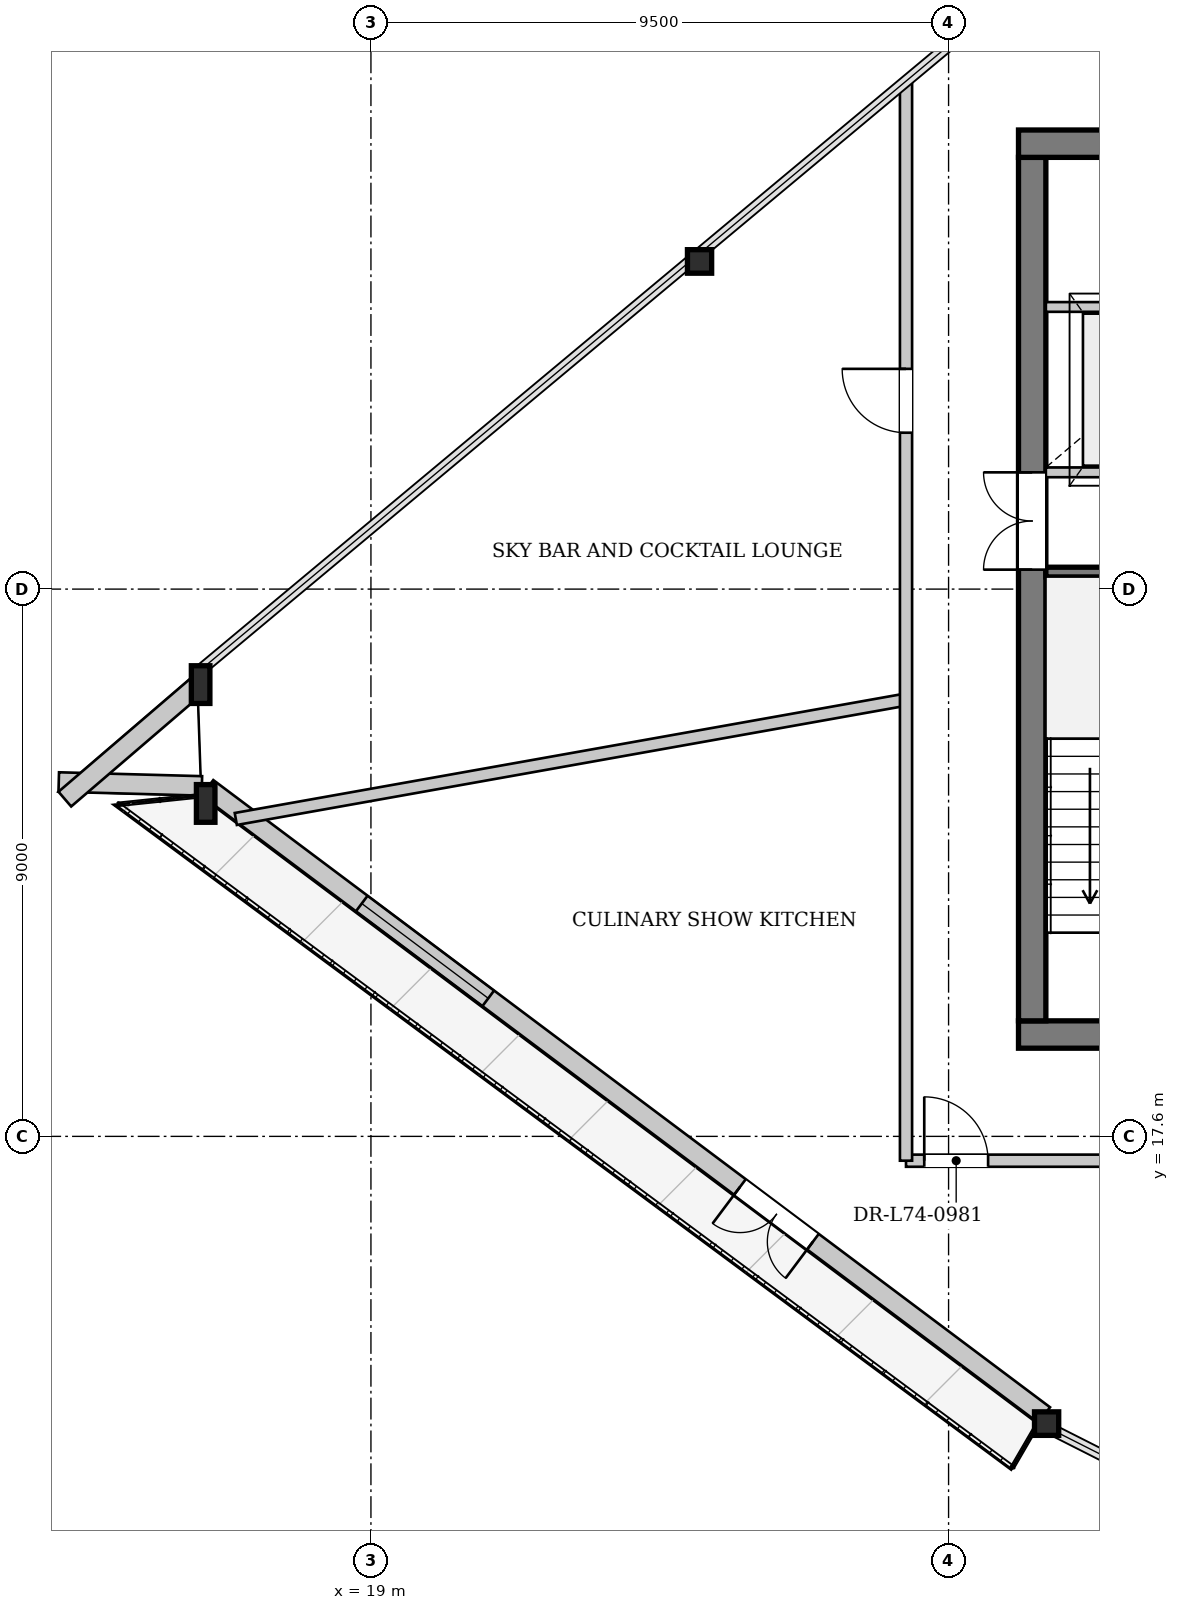
"""IFC4 building model, lengths in metres.
Left out: names, types, materials, properties, quantities, classifications, styles, units other than length and angle.
Written with IfcOpenShell. Run it as: python <this file> out.ifc"""

import sys

from ifc_helpers import new_model, si_unit, direction, frame, frame_2d, origin, origin_2d, place, context, subcontext, project, spatial, rectangle, i_section, extrude, source, transform, mapped, element, fill, save


model = new_model("IFC4")
c1 = context("Model", 3, precision=1e-05, world=origin(), true_north=direction((0.0, 1.0)))
c2 = subcontext(c1, "Body", "Model", "MODEL_VIEW")
j1 = project(units=[si_unit("LENGTHUNIT", "METRE"), si_unit("PLANEANGLEUNIT", "RADIAN")], contexts=[c1])
p1 = place(None, origin())
s1 = spatial("IfcSite", under=j1, at=p1, CompositionType="ELEMENT")
p2 = place(p1, origin())
s2 = spatial("IfcBuilding", under=s1, at=p2, CompositionType="ELEMENT")
p3 = place(p2, frame((0.0, 0.0, 277.7)))
s3 = spatial("IfcBuildingStorey", under=s2, at=p3, CompositionType="ELEMENT", Elevation=277.7)
m1 = source(origin(), c2, "Body", "SweptSolid", [
    extrude(i_section(OverallWidth=0.398, OverallDepth=0.387, WebThickness=0.019, FlangeThickness=0.029, at=origin_2d()), origin(), (0.0, 0.0, 1.0), 3.945),
])
p4 = place(p3, frame((24.417, 32.13, 0.0), z_axis=(-0.006311849175, -0.071843695024, 0.997395931436), x_axis=(0.996162921668, -0.087518189501, 0.0)))
e1 = element("IfcColumn", 1, at=p4, inside=s3, PredefinedType="COLUMN", context=c2, shape_type="MappedRepresentation", body=[
    mapped(m1, transform((0.0, 0.0, 0.0), x_axis=(1.0, 0.0, 0.0), y_axis=(0.0, 1.0, 0.0), z_axis=(0.0, 0.0, 1.0), scale=1.0)),
])
m2 = source(origin(), c2, "Body", "SweptSolid", [
    extrude(i_section(OverallWidth=0.305, OverallDepth=0.62, WebThickness=0.021, FlangeThickness=0.04, at=origin_2d()), origin(), (0.0, 0.0, 1.0), 3.956),
])
p5 = place(p3, frame((16.145, 25.227, 0.0), z_axis=(0.027522629563, -0.099661539784, 0.99464068002), x_axis=(0.963918716253, 0.266196747646, 0.0)))
e2 = element("IfcColumn", 2, at=p5, inside=s3, PredefinedType="COLUMN", context=c2, shape_type="MappedRepresentation", body=[
    mapped(m2, transform((0.0, 0.0, 0.0), x_axis=(1.0, 0.0, 0.0), y_axis=(0.0, 1.0, 0.0), z_axis=(0.0, 0.0, 1.0), scale=1.0)),
])
m3 = source(origin(), c2, "Body", "SweptSolid", [
    extrude(i_section(OverallWidth=0.305, OverallDepth=0.62, WebThickness=0.021, FlangeThickness=0.04, at=origin_2d()), origin(), (0.0, 0.0, 1.0), 3.946),
])
p6 = place(p3, frame((16.215, 23.204, 0.0), z_axis=(0.033907558739, -0.065092612761, 0.997302977647), x_axis=(0.886885299691, 0.461989680828, 0.0)))
e3 = element("IfcColumn", 3, at=p6, inside=s3, PredefinedType="COLUMN", context=c2, shape_type="MappedRepresentation", body=[
    mapped(m3, transform((0.0, 0.0, 0.0), x_axis=(1.0, 0.0, 0.0), y_axis=(0.0, 1.0, 0.0), z_axis=(0.0, 0.0, 1.0), scale=1.0)),
])
m4 = source(origin(), c2, "Body", "SweptSolid", [
    extrude(i_section(OverallWidth=0.398, OverallDepth=0.387, WebThickness=0.019, FlangeThickness=0.029, at=origin_2d()), origin(), (0.0, 0.0, 1.0), 3.945),
])
p7 = place(p3, frame((29.977, 12.889, 0.0), z_axis=(0.068826100896, -0.006560761416, 0.997607099135), x_axis=(0.094893585197, 0.995487422064, 0.0)))
e4 = element("IfcColumn", 4, at=p7, inside=s3, PredefinedType="COLUMN", context=c2, shape_type="MappedRepresentation", body=[
    mapped(m4, transform((0.0, 0.0, 0.0), x_axis=(1.0, 0.0, 0.0), y_axis=(0.0, 1.0, 0.0), z_axis=(0.0, 0.0, 1.0), scale=1.0)),
])
p8 = place(p3, frame((30.073, 13.017, 0.0), z_axis=(0.0, 0.0, 1.0), x_axis=(-0.800180538876, 0.599759206018, 0.0)))
e5 = element("IfcWall", 5, at=p8, inside=s3, PredefinedType="SOLIDWALL", context=c2, shape_type="SweptSolid", body=[
    extrude(rectangle(XDim=17.198, YDim=0.32, at=frame_2d((8.599, 0.0))), origin(), (0.0, 0.0, 1.0), 3.462),
])
p9 = place(p8, frame((4.753, 0.0, 0.0)))
e6 = element("IfcOpeningElement", 6, at=p9, cuts=e5, PredefinedType="OPENING", context=c2, shape_type="SweptSolid", body=[
    extrude(rectangle(XDim=1.5, YDim=2.3, at=frame_2d((0.75, 1.15))), frame((0.0, 0.17, 0.0), z_axis=(0.0, -1.0, 0.0), x_axis=(1.0, 0.0, 0.0)), (0.0, 0.0, 1.0), 0.34),
])
p10 = place(p8, frame((11.426, 0.0, 0.65)))
e7 = element("IfcOpeningElement", 7, at=p10, cuts=e5, PredefinedType="OPENING", context=c2, shape_type="SweptSolid", body=[
    extrude(rectangle(XDim=2.6, YDim=2.35, at=frame_2d((1.3, 1.175))), frame((0.0, 0.17, 0.0), z_axis=(0.0, -1.0, 0.0), x_axis=(1.0, 0.0, 0.0)), (0.0, 0.0, 1.0), 0.34),
])
p11 = place(p3, frame((16.219, 23.364, 0.0), z_axis=(0.0, 0.0, 1.0), x_axis=(-0.999633757941, 0.027061965649, 0.0)))
e8 = element("IfcWall", 8, at=p11, inside=s3, PredefinedType="SOLIDWALL", context=c2, shape_type="SweptSolid", body=[
    extrude(rectangle(XDim=2.355, YDim=0.32, at=frame_2d((1.177, 0.0))), origin(), (0.0, 0.0, 1.0), 3.462),
])
p12 = place(p3, frame((13.966, 23.146, 0.0), z_axis=(0.0, 0.0, 1.0), x_axis=(0.758861199742, 0.651252393106, 0.0)))
e9 = element("IfcWall", 9, at=p12, inside=s3, PredefinedType="SOLIDWALL", context=c2, shape_type="SweptSolid", body=[
    extrude(rectangle(XDim=3.008, YDim=0.32, at=frame_2d((1.504, 0.0))), origin(), (0.0, 0.0, 1.0), 3.462),
])
p13 = place(p3, frame((46.35, 19.275, 0.0), z_axis=(0.0, 0.0, 1.0), x_axis=(-1.0, 0.0, 0.0)))
e10 = element("IfcWall", 10, at=p13, inside=s3, PredefinedType="SHEAR", context=c2, shape_type="SweptSolid", body=[
    extrude(rectangle(XDim=16.7, YDim=0.45, at=frame_2d((8.35, 0.0))), origin(), (0.0, 0.0, 1.0), 3.92),
])
p14 = place(p13, frame((4.55, 0.0, 0.0)))
e11 = element("IfcOpeningElement", 11, at=p14, cuts=e10, PredefinedType="OPENING", context=c2, shape_type="SweptSolid", body=[
    extrude(rectangle(XDim=1.12, YDim=2.25, at=frame_2d((0.56, 1.125))), frame((0.0, 0.235, 0.0), z_axis=(0.0, -1.0, 0.0), x_axis=(1.0, 0.0, 0.0)), (0.0, 0.0, 1.0), 0.47),
])
p15 = place(p13, frame((11.05, 0.0, 0.0)))
e12 = element("IfcOpeningElement", 12, at=p15, cuts=e10, PredefinedType="OPENING", context=c2, shape_type="SweptSolid", body=[
    extrude(rectangle(XDim=1.12, YDim=2.25, at=frame_2d((0.56, 1.125))), frame((0.0, 0.235, 0.0), z_axis=(0.0, -1.0, 0.0), x_axis=(1.0, 0.0, 0.0)), (0.0, 0.0, 1.0), 0.47),
])
p16 = place(p3, frame((29.875, 19.5, 0.0), z_axis=(0.0, 0.0, 1.0), x_axis=(0.0, 1.0, 0.0)))
e13 = element("IfcWall", 13, at=p16, inside=s3, PredefinedType="SHEAR", context=c2, shape_type="SweptSolid", body=[
    extrude(rectangle(XDim=14.2, YDim=0.45, at=frame_2d((7.1, 0.0))), origin(), (0.0, 0.0, 1.0), 3.92),
])
p17 = place(p16, frame((7.42, 0.0, 0.0)))
e14 = element("IfcOpeningElement", 14, at=p17, cuts=e13, PredefinedType="OPENING", context=c2, shape_type="SweptSolid", body=[
    extrude(rectangle(XDim=1.6, YDim=2.2, at=frame_2d((0.8, 1.1))), frame((0.0, 0.235, 0.0), z_axis=(0.0, -1.0, 0.0), x_axis=(1.0, 0.0, 0.0)), (0.0, 0.0, 1.0), 0.47),
])
p18 = place(p3, frame((29.65, 33.925, 0.0), z_axis=(0.0, 0.0, 1.0), x_axis=(1.0, 0.0, 0.0)))
e15 = element("IfcWall", 15, at=p18, inside=s3, PredefinedType="SHEAR", context=c2, shape_type="SweptSolid", body=[
    extrude(rectangle(XDim=16.7, YDim=0.45, at=frame_2d((8.35, 0.0))), origin(), (0.0, 0.0, 1.0), 3.92),
])
p19 = place(p18, frame((1.45, 0.0, 0.0)))
e16 = element("IfcOpeningElement", 16, at=p19, cuts=e15, PredefinedType="OPENING", context=c2, shape_type="SweptSolid", body=[
    extrude(rectangle(XDim=0.95, YDim=2.1, at=frame_2d((0.475, 1.05))), frame((0.0, 0.235, 0.0), z_axis=(0.0, -1.0, 0.0), x_axis=(1.0, 0.0, 0.0)), (0.0, 0.0, 1.0), 0.47),
])
p20 = place(p18, frame((3.83, 0.0, 0.0)))
e17 = element("IfcOpeningElement", 17, at=p20, cuts=e15, PredefinedType="OPENING", context=c2, shape_type="SweptSolid", body=[
    extrude(rectangle(XDim=1.32, YDim=2.2, at=frame_2d((0.66, 1.1))), frame((0.0, 0.235, 0.0), z_axis=(0.0, -1.0, 0.0), x_axis=(1.0, 0.0, 0.0)), (0.0, 0.0, 1.0), 0.47),
])
for number, where, z_axis, x_axis in (
    (18, (30.1, 26.88, 0.0), (0.0, 0.0, 1.0), (1.0, 0.0, 0.0)),
    (19, (30.1, 28.52, 0.0), (0.0, 0.0, 1.0), (1.0, 0.0, 0.0)),
):
    element("IfcWall", number, at=place(p3, frame(where, z_axis=z_axis, x_axis=x_axis)), inside=s3, PredefinedType="PARTITIONING", context=c2, shape_type="SweptSolid", body=[
        extrude(rectangle(XDim=3.02, YDim=0.16, at=frame_2d((1.51, 0.0))), origin(), (0.0, 0.0, 1.0), 3.92),
    ])
p21 = place(p3, frame((30.1, 31.24, 0.0), z_axis=(0.0, 0.0, 1.0), x_axis=(1.0, 0.0, 0.0)))
e20 = element("IfcWall", 20, at=p21, inside=s3, PredefinedType="PARTITIONING", context=c2, shape_type="SweptSolid", body=[
    extrude(rectangle(XDim=3.02, YDim=0.16, at=frame_2d((1.51, 0.0))), origin(), (0.0, 0.0, 1.0), 3.92),
])
p22 = place(p21, frame((0.91, 0.0, 0.0)))
e21 = element("IfcOpeningElement", 21, at=p22, cuts=e20, PredefinedType="OPENING", context=c2, shape_type="SweptSolid", body=[
    extrude(rectangle(XDim=1.2, YDim=2.2, at=frame_2d((0.6, 1.1))), frame((0.0, 0.09, 0.0), z_axis=(0.0, -1.0, 0.0), x_axis=(1.0, 0.0, 0.0)), (0.0, 0.0, 1.0), 0.18),
])
p23 = place(p3, frame((27.8, 24.783, 0.0), z_axis=(0.0, 0.0, 1.0), x_axis=(-0.98449973, -0.175386093036, 0.0)))
e22 = element("IfcWall", 22, at=p23, inside=s3, PredefinedType="PARTITIONING", context=c2, shape_type="SweptSolid", body=[
    extrude(rectangle(XDim=11.196, YDim=0.2, at=frame_2d((5.598, 0.0))), origin(), (0.0, 0.0, 1.0), 3.92),
])
p24 = place(p3, frame((27.8, 17.2, 0.0), z_axis=(0.0, 0.0, 1.0), x_axis=(1.0, 0.0, 0.0)))
e23 = element("IfcWall", 23, at=p24, inside=s3, PredefinedType="PARTITIONING", context=c2, shape_type="SweptSolid", body=[
    extrude(rectangle(XDim=20.4, YDim=0.2, at=frame_2d((10.2, 0.0))), origin(), (0.0, 0.0, 1.0), 3.92),
])
p25 = place(p24, frame((0.3, 0.0, 0.0)))
e24 = element("IfcOpeningElement", 24, at=p25, cuts=e23, PredefinedType="OPENING", context=c2, shape_type="SweptSolid", body=[
    extrude(rectangle(XDim=1.05, YDim=2.2, at=frame_2d((0.525, 1.1))), frame((0.0, 0.11, 0.0), z_axis=(0.0, -1.0, 0.0), x_axis=(1.0, 0.0, 0.0)), (0.0, 0.0, 1.0), 0.22),
])
p26 = place(p24, frame((11.805, 0.0, 0.0)))
e25 = element("IfcOpeningElement", 25, at=p26, cuts=e23, PredefinedType="OPENING", context=c2, shape_type="SweptSolid", body=[
    extrude(rectangle(XDim=1.05, YDim=2.2, at=frame_2d((0.525, 1.1))), frame((0.0, 0.11, 0.0), z_axis=(0.0, -1.0, 0.0), x_axis=(1.0, 0.0, 0.0)), (0.0, 0.0, 1.0), 0.22),
])
p27 = place(p24, frame((19.05, 0.0, 0.0)))
e26 = element("IfcOpeningElement", 26, at=p27, cuts=e23, PredefinedType="OPENING", context=c2, shape_type="SweptSolid", body=[
    extrude(rectangle(XDim=1.05, YDim=2.2, at=frame_2d((0.525, 1.1))), frame((0.0, 0.11, 0.0), z_axis=(0.0, -1.0, 0.0), x_axis=(1.0, 0.0, 0.0)), (0.0, 0.0, 1.0), 0.22),
])
p28 = place(p3, frame((27.8, 17.2, 0.0), z_axis=(0.0, 0.0, 1.0), x_axis=(0.0, 1.0, 0.0)))
e27 = element("IfcWall", 27, at=p28, inside=s3, PredefinedType="PARTITIONING", context=c2, shape_type="SweptSolid", body=[
    extrude(rectangle(XDim=17.714, YDim=0.2, at=frame_2d((8.857, 0.0))), origin(), (0.0, 0.0, 1.0), 3.92),
])
p29 = place(p28, frame((11.972, 0.0, 0.0)))
e28 = element("IfcOpeningElement", 28, at=p29, cuts=e27, PredefinedType="OPENING", context=c2, shape_type="SweptSolid", body=[
    extrude(rectangle(XDim=1.05, YDim=2.2, at=frame_2d((0.525, 1.1))), frame((0.0, 0.11, 0.0), z_axis=(0.0, -1.0, 0.0), x_axis=(1.0, 0.0, 0.0)), (0.0, 0.0, 1.0), 0.22),
])
m5 = source(origin(), c2, "Body", "SweptSolid", [
    extrude(rectangle(XDim=1.5, YDim=2.3, at=frame_2d((0.75, 1.15))), frame((0.0, 0.025, 0.0), z_axis=(0.0, -1.0, 0.0), x_axis=(1.0, 0.0, 0.0)), (0.0, 0.0, 1.0), 0.05),
])
p30 = place(p9, origin())
e29 = element("IfcDoor", 29, at=p30, inside=s3, OperationType="DOUBLE_DOOR_SINGLE_SWING", PredefinedType="DOOR", context=c2, shape_type="MappedRepresentation", body=[
    mapped(m5, transform((0.0, 0.0, 0.0), x_axis=(1.0, 0.0, 0.0), y_axis=(0.0, 1.0, 0.0), z_axis=(0.0, 0.0, 1.0), scale=1.0)),
])
fill(e6, e29)
m6 = source(origin(), c2, "Body", "SweptSolid", [
    extrude(rectangle(XDim=2.6, YDim=2.35, at=frame_2d((1.3, 1.175))), frame((0.0, 0.03, 0.0), z_axis=(0.0, -1.0, 0.0), x_axis=(1.0, 0.0, 0.0)), (0.0, 0.0, 1.0), 0.06),
])
p31 = place(p10, origin())
e30 = element("IfcWindow", 30, at=p31, inside=s3, PartitioningType="SINGLE_PANEL", PredefinedType="WINDOW", context=c2, shape_type="MappedRepresentation", body=[
    mapped(m6, transform((0.0, 0.0, 0.0), x_axis=(1.0, 0.0, 0.0), y_axis=(0.0, 1.0, 0.0), z_axis=(0.0, 0.0, 1.0), scale=1.0)),
])
fill(e7, e30)
m7 = source(origin(), c2, "Body", "SweptSolid", [
    extrude(rectangle(XDim=1.6, YDim=2.2, at=frame_2d((0.8, 1.1))), frame((0.0, 0.025, 0.0), z_axis=(0.0, -1.0, 0.0), x_axis=(1.0, 0.0, 0.0)), (0.0, 0.0, 1.0), 0.05),
])
p32 = place(p17, origin())
e31 = element("IfcDoor", 31, at=p32, inside=s3, OperationType="DOUBLE_DOOR_SINGLE_SWING", PredefinedType="DOOR", context=c2, shape_type="MappedRepresentation", body=[
    mapped(m7, transform((0.0, 0.0, 0.0), x_axis=(1.0, 0.0, 0.0), y_axis=(0.0, 1.0, 0.0), z_axis=(0.0, 0.0, 1.0), scale=1.0)),
])
fill(e14, e31)
m8 = source(origin(), c2, "Body", "SweptSolid", [
    extrude(rectangle(XDim=1.05, YDim=2.2, at=frame_2d((0.525, 1.1))), frame((0.0, 0.025, 0.0), z_axis=(0.0, -1.0, 0.0), x_axis=(1.0, 0.0, 0.0)), (0.0, 0.0, 1.0), 0.05),
])
p33 = place(p25, origin())
e32 = element("IfcDoor", 32, at=p33, inside=s3, OperationType="SINGLE_SWING_LEFT", PredefinedType="DOOR", context=c2, shape_type="MappedRepresentation", body=[
    mapped(m8, transform((0.0, 0.0, 0.0), x_axis=(1.0, 0.0, 0.0), y_axis=(0.0, 1.0, 0.0), z_axis=(0.0, 0.0, 1.0), scale=1.0)),
])
fill(e24, e32)
p34 = place(p29, origin())
e33 = element("IfcDoor", 33, at=p34, inside=s3, OperationType="SINGLE_SWING_RIGHT", PredefinedType="DOOR", context=c2, shape_type="MappedRepresentation", body=[
    mapped(m8, transform((0.0, 0.0, 0.0), x_axis=(1.0, 0.0, 0.0), y_axis=(0.0, 1.0, 0.0), z_axis=(0.0, 0.0, 1.0), scale=1.0)),
])
fill(e28, e33)
save(model, sys.argv[1])
